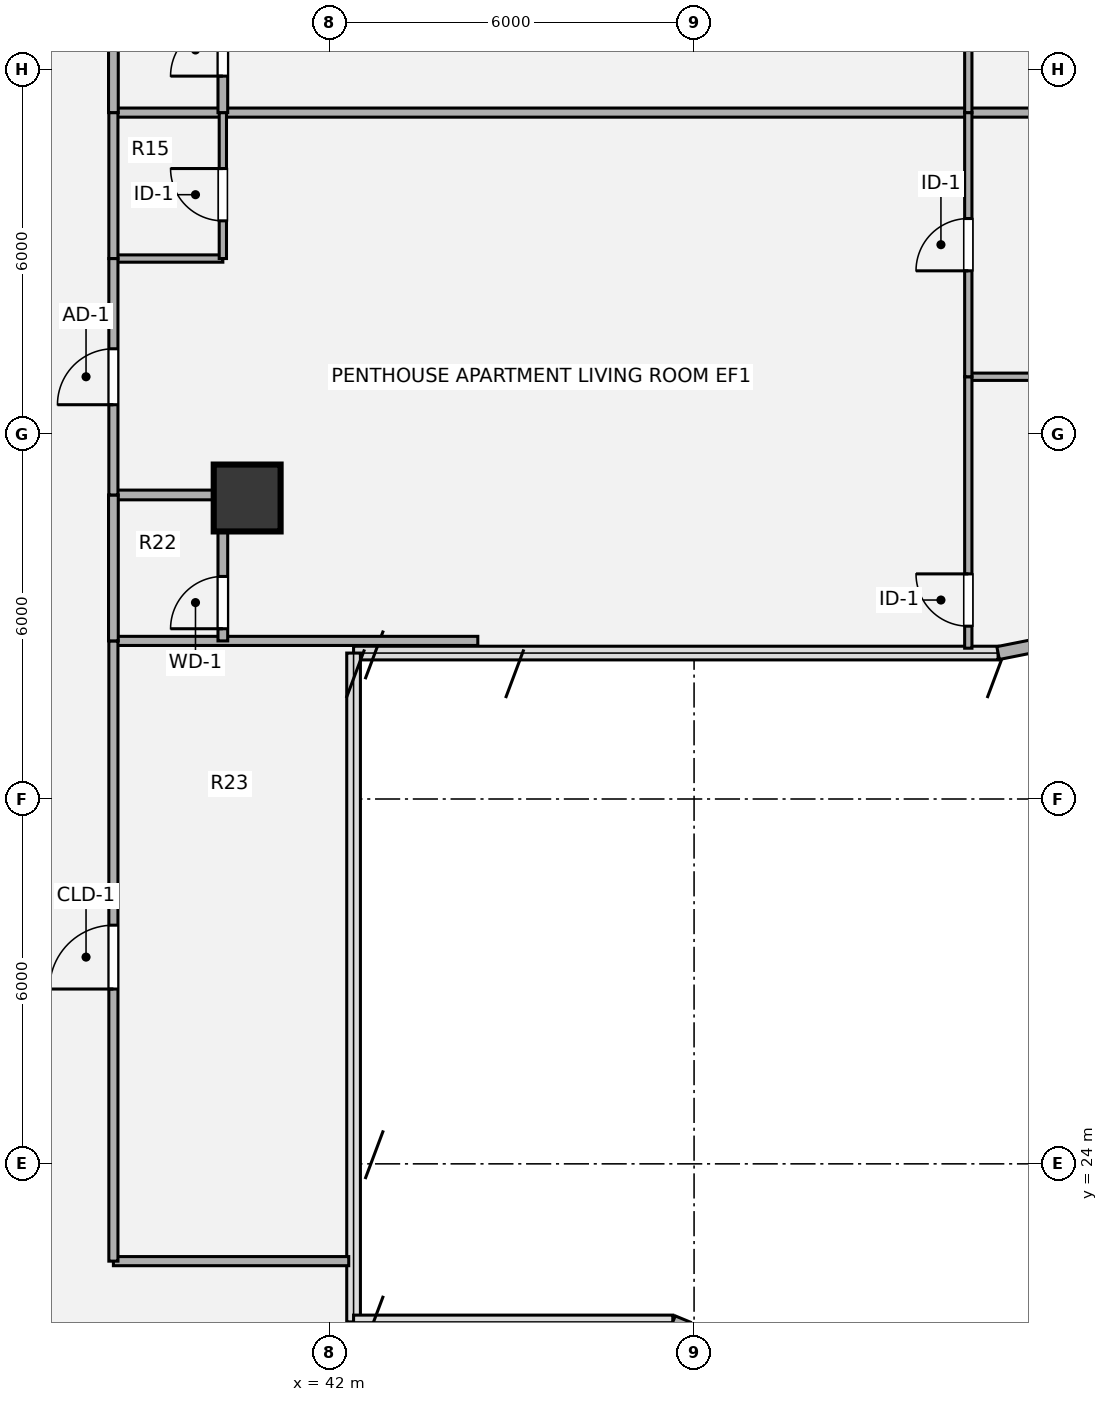
"""IFC4 building model, lengths in metres.
Left out: names, types, materials, properties, quantities, classifications, styles, units other than length and angle.
Written with IfcOpenShell. Run it as: python <this file> out.ifc"""

import sys

from ifc_helpers import new_model, si_unit, direction, frame, frame_2d, origin, origin_2d, place, context, subcontext, project, spatial, rectangle, hollow_circle, extrude, source, transform, mapped, element, fill, save


model = new_model("IFC4")
c1 = context("Model", 3, precision=1e-05, world=origin(), true_north=direction((0.0, 1.0)))
c2 = subcontext(c1, "Body", "Model", "MODEL_VIEW")
j1 = project(units=[si_unit("LENGTHUNIT", "METRE"), si_unit("PLANEANGLEUNIT", "RADIAN")], contexts=[c1])
p1 = place(None, origin())
s1 = spatial("IfcSite", under=j1, at=p1, CompositionType="ELEMENT")
p2 = place(p1, origin())
s2 = spatial("IfcBuilding", under=s1, at=p2, CompositionType="ELEMENT")
p3 = place(p2, frame((0.0, 0.0, 160.2)))
s3 = spatial("IfcBuildingStorey", under=s2, at=p3, CompositionType="ELEMENT", Elevation=160.2)
m1 = source(origin(), c2, "Body", "SweptSolid", [
    extrude(hollow_circle(Radius=0.55, WallThickness=0.04, at=origin_2d()), origin(), (0.0, 0.0, 1.0), 3.78),
])
p4 = place(p3, frame((40.65, 34.95, 0.0), z_axis=(0.0, 0.0, 1.0), x_axis=(1.0, 0.0, 0.0)))
e1 = element("IfcColumn", 1, at=p4, inside=s3, PredefinedType="COLUMN", context=c2, shape_type="MappedRepresentation", body=[
    mapped(m1, transform((0.0, 0.0, 0.0), x_axis=(1.0, 0.0, 0.0), y_axis=(0.0, 1.0, 0.0), z_axis=(0.0, 0.0, 1.0), scale=1.0)),
])
p5 = place(p3, frame((54.225, 32.644, 0.0), z_axis=(0.0, 0.0, 1.0), x_axis=(-0.980775717779, -0.195138390419, 0.0)))
e2 = element("IfcWall", 2, at=p5, inside=s3, PredefinedType="SOLIDWALL", context=c2, shape_type="SweptSolid", body=[
    extrude(rectangle(XDim=1.249, YDim=0.215, at=frame_2d((0.624, 0.0))), origin(), (0.0, 0.0, 1.0), 3.53),
])
p6 = place(p3, frame((47.65, 21.4, 0.0), z_axis=(0.0, 0.0, 1.0), x_axis=(0.924205486139, -0.381895560841, 0.0)))
e3 = element("IfcWall", 3, at=p6, inside=s3, PredefinedType="SOLIDWALL", context=c2, shape_type="SweptSolid", body=[
    extrude(rectangle(XDim=0.268, YDim=0.215, at=frame_2d((0.134, 0.0))), origin(), (0.0, 0.0, 1.0), 3.53),
])
p7 = place(p3, frame((38.45, 22.4, 0.0), z_axis=(0.0, 0.0, 1.0), x_axis=(1.0, 0.0, 0.0)))
e4 = element("IfcWall", 4, at=p7, inside=s3, PredefinedType="PARTITIONING", context=c2, shape_type="SweptSolid", body=[
    extrude(rectangle(XDim=3.87, YDim=0.15, at=frame_2d((1.935, 0.0))), origin(), (0.0, 0.0, 1.0), 3.5),
])
p8 = place(p3, frame((38.45, 32.6, 0.0), z_axis=(0.0, 0.0, 1.0), x_axis=(1.0, 0.0, 0.0)))
e5 = element("IfcWall", 5, at=p8, inside=s3, PredefinedType="PARTITIONING", context=c2, shape_type="SweptSolid", body=[
    extrude(rectangle(XDim=5.993, YDim=0.15, at=frame_2d((2.997, 0.0))), origin(), (0.0, 0.0, 1.0), 3.5),
])
p9 = place(p3, frame((38.45, 35.0, 0.0), z_axis=(0.0, 0.0, 1.0), x_axis=(1.0, 0.0, 0.0)))
e6 = element("IfcWall", 6, at=p9, inside=s3, PredefinedType="PLUMBINGWALL", context=c2, shape_type="SweptSolid", body=[
    extrude(rectangle(XDim=1.8, YDim=0.16, at=frame_2d((0.9, 0.0))), origin(), (0.0, 0.0, 1.0), 2.903),
])
p10 = place(p3, frame((52.51, 36.944, 0.0), z_axis=(0.0, 0.0, 1.0), x_axis=(1.0, 0.0, 0.0)))
e7 = element("IfcWall", 7, at=p10, inside=s3, PredefinedType="PARTITIONING", context=c2, shape_type="SweptSolid", body=[
    extrude(rectangle(XDim=3.61, YDim=0.12, at=frame_2d((1.805, 0.0))), origin(), (0.0, 0.0, 1.0), 2.982),
])
p11 = place(p3, frame((38.45, 38.888, 0.0), z_axis=(0.0, 0.0, 1.0), x_axis=(1.0, 0.0, 0.0)))
e8 = element("IfcWall", 8, at=p11, inside=s3, PredefinedType="PARTITIONING", context=c2, shape_type="SweptSolid", body=[
    extrude(rectangle(XDim=1.8, YDim=0.12, at=frame_2d((0.9, 0.0))), origin(), (0.0, 0.0, 1.0), 3.259),
])
p12 = place(p3, frame((38.45, 41.288, 0.0), z_axis=(0.0, 0.0, 1.0), x_axis=(1.0, 0.0, 0.0)))
e9 = element("IfcWall", 9, at=p12, inside=s3, PredefinedType="PARTITIONING", context=c2, shape_type="SweptSolid", body=[
    extrude(rectangle(XDim=17.67, YDim=0.15, at=frame_2d((8.835, 0.0))), origin(), (0.0, 0.0, 1.0), 2.982),
])
p13 = place(p3, frame((38.45, 22.4, 0.0), z_axis=(0.0, 0.0, 1.0), x_axis=(0.0, 1.0, 0.0)))
e10 = element("IfcWall", 10, at=p13, inside=s3, PredefinedType="PARTITIONING", context=c2, shape_type="SweptSolid", body=[
    extrude(rectangle(XDim=10.2, YDim=0.15, at=frame_2d((5.1, 0.0))), origin(), (0.0, 0.0, 1.0), 3.5),
])
p14 = place(p13, frame((4.475, 0.0, 0.0)))
e11 = element("IfcOpeningElement", 11, at=p14, cuts=e10, PredefinedType="OPENING", context=c2, shape_type="SweptSolid", body=[
    extrude(rectangle(XDim=1.05, YDim=2.1, at=origin_2d()), frame((0.525, 0.085, 1.05), z_axis=(0.0, -1.0, 0.0), x_axis=(1.0, 0.0, 0.0)), (0.0, 0.0, 1.0), 0.17),
])
p15 = place(p3, frame((38.45, 32.6, 0.0), z_axis=(0.0, 0.0, 1.0), x_axis=(0.0, 1.0, 0.0)))
e12 = element("IfcWall", 12, at=p15, inside=s3, PredefinedType="PLUMBINGWALL", context=c2, shape_type="SweptSolid", body=[
    extrude(rectangle(XDim=2.4, YDim=0.16, at=frame_2d((1.2, 0.0))), origin(), (0.0, 0.0, 1.0), 3.5),
])
p16 = place(p3, frame((38.45, 35.0, 0.0), z_axis=(0.0, 0.0, 1.0), x_axis=(0.0, 1.0, 0.0)))
e13 = element("IfcWall", 13, at=p16, inside=s3, PredefinedType="PARTITIONING", context=c2, shape_type="SweptSolid", body=[
    extrude(rectangle(XDim=3.888, YDim=0.15, at=frame_2d((1.944, 0.0))), origin(), (0.0, 0.0, 1.0), 3.5),
])
p17 = place(p16, frame((1.484, 0.0, 0.0)))
e14 = element("IfcOpeningElement", 14, at=p17, cuts=e13, PredefinedType="OPENING", context=c2, shape_type="SweptSolid", body=[
    extrude(rectangle(XDim=0.92, YDim=2.1, at=origin_2d()), frame((0.46, 0.085, 1.05), z_axis=(0.0, -1.0, 0.0), x_axis=(1.0, 0.0, 0.0)), (0.0, 0.0, 1.0), 0.17),
])
p18 = place(p3, frame((38.45, 38.888, 0.0), z_axis=(0.0, 0.0, 1.0), x_axis=(0.0, 1.0, 0.0)))
e15 = element("IfcWall", 15, at=p18, inside=s3, PredefinedType="PARTITIONING", context=c2, shape_type="SweptSolid", body=[
    extrude(rectangle(XDim=2.4, YDim=0.15, at=frame_2d((1.2, 0.0))), origin(), (0.0, 0.0, 1.0), 3.5),
])
p19 = place(p3, frame((38.45, 41.288, 0.0), z_axis=(0.0, 0.0, 1.0), x_axis=(0.0, 1.0, 0.0)))
e16 = element("IfcWall", 16, at=p19, inside=s3, PredefinedType="PLUMBINGWALL", context=c2, shape_type="SweptSolid", body=[
    extrude(rectangle(XDim=2.4, YDim=0.16, at=frame_2d((1.2, 0.0))), origin(), (0.0, 0.0, 1.0), 3.5),
])
p20 = place(p3, frame((40.25, 32.6, 0.0), z_axis=(0.0, 0.0, 1.0), x_axis=(0.0, 1.0, 0.0)))
e17 = element("IfcWall", 17, at=p20, inside=s3, PredefinedType="PLUMBINGWALL", context=c2, shape_type="SweptSolid", body=[
    extrude(rectangle(XDim=2.4, YDim=0.16, at=frame_2d((1.2, 0.0))), origin(), (0.0, 0.0, 1.0), 3.5),
])
p21 = place(p20, frame((0.2, 0.0, 0.0)))
e18 = element("IfcOpeningElement", 18, at=p21, cuts=e17, PredefinedType="OPENING", context=c2, shape_type="SweptSolid", body=[
    extrude(rectangle(XDim=0.86, YDim=2.1, at=origin_2d()), frame((0.43, 0.09, 1.05), z_axis=(0.0, -1.0, 0.0), x_axis=(1.0, 0.0, 0.0)), (0.0, 0.0, 1.0), 0.18),
])
p22 = place(p3, frame((40.25, 38.888, 0.0), z_axis=(0.0, 0.0, 1.0), x_axis=(0.0, 1.0, 0.0)))
e19 = element("IfcWall", 19, at=p22, inside=s3, PredefinedType="PARTITIONING", context=c2, shape_type="SweptSolid", body=[
    extrude(rectangle(XDim=2.4, YDim=0.12, at=frame_2d((1.2, 0.0))), origin(), (0.0, 0.0, 1.0), 3.5),
])
p23 = place(p22, frame((0.62, 0.0, 0.0)))
e20 = element("IfcOpeningElement", 20, at=p23, cuts=e19, PredefinedType="OPENING", context=c2, shape_type="SweptSolid", body=[
    extrude(rectangle(XDim=0.86, YDim=2.1, at=origin_2d()), frame((0.43, 0.07, 1.05), z_axis=(0.0, -1.0, 0.0), x_axis=(1.0, 0.0, 0.0)), (0.0, 0.0, 1.0), 0.14),
])
p24 = place(p3, frame((40.25, 41.288, 0.0), z_axis=(0.0, 0.0, 1.0), x_axis=(0.0, 1.0, 0.0)))
e21 = element("IfcWall", 21, at=p24, inside=s3, PredefinedType="PLUMBINGWALL", context=c2, shape_type="SweptSolid", body=[
    extrude(rectangle(XDim=2.4, YDim=0.16, at=frame_2d((1.2, 0.0))), origin(), (0.0, 0.0, 1.0), 3.5),
])
p25 = place(p24, frame((0.6, 0.0, 0.0)))
e22 = element("IfcOpeningElement", 22, at=p25, cuts=e21, PredefinedType="OPENING", context=c2, shape_type="SweptSolid", body=[
    extrude(rectangle(XDim=0.86, YDim=2.1, at=origin_2d()), frame((0.43, 0.09, 1.05), z_axis=(0.0, -1.0, 0.0), x_axis=(1.0, 0.0, 0.0)), (0.0, 0.0, 1.0), 0.18),
])
p26 = place(p3, frame((52.51, 32.48, 0.0), z_axis=(0.0, 0.0, 1.0), x_axis=(0.0, 1.0, 0.0)))
e23 = element("IfcWall", 23, at=p26, inside=s3, PredefinedType="PARTITIONING", context=c2, shape_type="SweptSolid", body=[
    extrude(rectangle(XDim=4.464, YDim=0.12, at=frame_2d((2.232, 0.0))), origin(), (0.0, 0.0, 1.0), 3.5),
])
p27 = place(p26, frame((0.362, 0.0, 0.0)))
e24 = element("IfcOpeningElement", 24, at=p27, cuts=e23, PredefinedType="OPENING", context=c2, shape_type="SweptSolid", body=[
    extrude(rectangle(XDim=0.86, YDim=2.1, at=origin_2d()), frame((0.43, 0.07, 1.05), z_axis=(0.0, -1.0, 0.0), x_axis=(1.0, 0.0, 0.0)), (0.0, 0.0, 1.0), 0.14),
])
p28 = place(p3, frame((52.51, 36.944, 0.0), z_axis=(0.0, 0.0, 1.0), x_axis=(0.0, 1.0, 0.0)))
e25 = element("IfcWall", 25, at=p28, inside=s3, PredefinedType="PARTITIONING", context=c2, shape_type="SweptSolid", body=[
    extrude(rectangle(XDim=4.344, YDim=0.12, at=frame_2d((2.172, 0.0))), origin(), (0.0, 0.0, 1.0), 3.5),
])
p29 = place(p28, frame((1.742, 0.0, 0.0)))
e26 = element("IfcOpeningElement", 26, at=p29, cuts=e25, PredefinedType="OPENING", context=c2, shape_type="SweptSolid", body=[
    extrude(rectangle(XDim=0.86, YDim=2.1, at=origin_2d()), frame((0.43, 0.07, 1.05), z_axis=(0.0, -1.0, 0.0), x_axis=(1.0, 0.0, 0.0)), (0.0, 0.0, 1.0), 0.14),
])
p30 = place(p3, frame((52.51, 41.288, 0.0), z_axis=(0.0, 0.0, 1.0), x_axis=(0.0, 1.0, 0.0)))
e27 = element("IfcWall", 27, at=p30, inside=s3, PredefinedType="PARTITIONING", context=c2, shape_type="SweptSolid", body=[
    extrude(rectangle(XDim=4.706, YDim=0.12, at=frame_2d((2.353, 0.0))), origin(), (0.0, 0.0, 1.0), 3.5),
])
p31 = place(p30, frame((1.923, 0.0, 0.0)))
e28 = element("IfcOpeningElement", 28, at=p31, cuts=e27, PredefinedType="OPENING", context=c2, shape_type="SweptSolid", body=[
    extrude(rectangle(XDim=0.86, YDim=2.1, at=origin_2d()), frame((0.43, 0.07, 1.05), z_axis=(0.0, -1.0, 0.0), x_axis=(1.0, 0.0, 0.0)), (0.0, 0.0, 1.0), 0.14),
])
m2 = source(origin(), c2, "Body", "SweptSolid", [
    extrude(rectangle(XDim=1.05, YDim=2.1, at=origin_2d()), frame((0.525, 0.025, 1.05), z_axis=(0.0, -1.0, 0.0), x_axis=(1.0, 0.0, 0.0)), (0.0, 0.0, 1.0), 0.05),
])
p32 = place(p14, origin())
e29 = element("IfcDoor", 29, at=p32, inside=s3, OperationType="SINGLE_SWING_LEFT", PredefinedType="DOOR", context=c2, shape_type="MappedRepresentation", body=[
    mapped(m2, transform((0.0, 0.0, 0.0), x_axis=(1.0, 0.0, 0.0), y_axis=(0.0, 1.0, 0.0), z_axis=(0.0, 0.0, 1.0), scale=1.0)),
])
fill(e11, e29)
m3 = source(origin(), c2, "Body", "SweptSolid", [
    extrude(rectangle(XDim=0.92, YDim=2.1, at=origin_2d()), frame((0.46, 0.025, 1.05), z_axis=(0.0, -1.0, 0.0), x_axis=(1.0, 0.0, 0.0)), (0.0, 0.0, 1.0), 0.05),
])
p33 = place(p17, origin())
e30 = element("IfcDoor", 30, at=p33, inside=s3, OperationType="SINGLE_SWING_LEFT", PredefinedType="DOOR", context=c2, shape_type="MappedRepresentation", body=[
    mapped(m3, transform((0.0, 0.0, 0.0), x_axis=(1.0, 0.0, 0.0), y_axis=(0.0, 1.0, 0.0), z_axis=(0.0, 0.0, 1.0), scale=1.0)),
])
fill(e14, e30)
m4 = source(origin(), c2, "Body", "SweptSolid", [
    extrude(rectangle(XDim=0.86, YDim=2.1, at=origin_2d()), frame((0.43, 0.025, 1.05), z_axis=(0.0, -1.0, 0.0), x_axis=(1.0, 0.0, 0.0)), (0.0, 0.0, 1.0), 0.05),
])
p34 = place(p21, origin())
e31 = element("IfcDoor", 31, at=p34, inside=s3, OperationType="SINGLE_SWING_LEFT", PredefinedType="DOOR", context=c2, shape_type="MappedRepresentation", body=[
    mapped(m4, transform((0.0, 0.0, 0.0), x_axis=(1.0, 0.0, 0.0), y_axis=(0.0, 1.0, 0.0), z_axis=(0.0, 0.0, 1.0), scale=1.0)),
])
fill(e18, e31)
m5 = source(origin(), c2, "Body", "SweptSolid", [
    extrude(rectangle(XDim=0.86, YDim=2.1, at=origin_2d()), frame((0.43, 0.025, 1.05), z_axis=(0.0, -1.0, 0.0), x_axis=(1.0, 0.0, 0.0)), (0.0, 0.0, 1.0), 0.05),
])
p35 = place(p23, origin())
e32 = element("IfcDoor", 32, at=p35, inside=s3, OperationType="SINGLE_SWING_RIGHT", PredefinedType="DOOR", context=c2, shape_type="MappedRepresentation", body=[
    mapped(m5, transform((0.0, 0.0, 0.0), x_axis=(1.0, 0.0, 0.0), y_axis=(0.0, 1.0, 0.0), z_axis=(0.0, 0.0, 1.0), scale=1.0)),
])
fill(e20, e32)
p36 = place(p25, origin())
e33 = element("IfcDoor", 33, at=p36, inside=s3, OperationType="SINGLE_SWING_LEFT", PredefinedType="DOOR", context=c2, shape_type="MappedRepresentation", body=[
    mapped(m4, transform((0.0, 0.0, 0.0), x_axis=(1.0, 0.0, 0.0), y_axis=(0.0, 1.0, 0.0), z_axis=(0.0, 0.0, 1.0), scale=1.0)),
])
fill(e22, e33)
p37 = place(p27, origin())
e34 = element("IfcDoor", 34, at=p37, inside=s3, OperationType="SINGLE_SWING_RIGHT", PredefinedType="DOOR", context=c2, shape_type="MappedRepresentation", body=[
    mapped(m5, transform((0.0, 0.0, 0.0), x_axis=(1.0, 0.0, 0.0), y_axis=(0.0, 1.0, 0.0), z_axis=(0.0, 0.0, 1.0), scale=1.0)),
])
fill(e24, e34)
p38 = place(p29, origin())
e35 = element("IfcDoor", 35, at=p38, inside=s3, OperationType="SINGLE_SWING_LEFT", PredefinedType="DOOR", context=c2, shape_type="MappedRepresentation", body=[
    mapped(m5, transform((0.0, 0.0, 0.0), x_axis=(1.0, 0.0, 0.0), y_axis=(0.0, 1.0, 0.0), z_axis=(0.0, 0.0, 1.0), scale=1.0)),
])
fill(e26, e35)
save(model, sys.argv[1])
